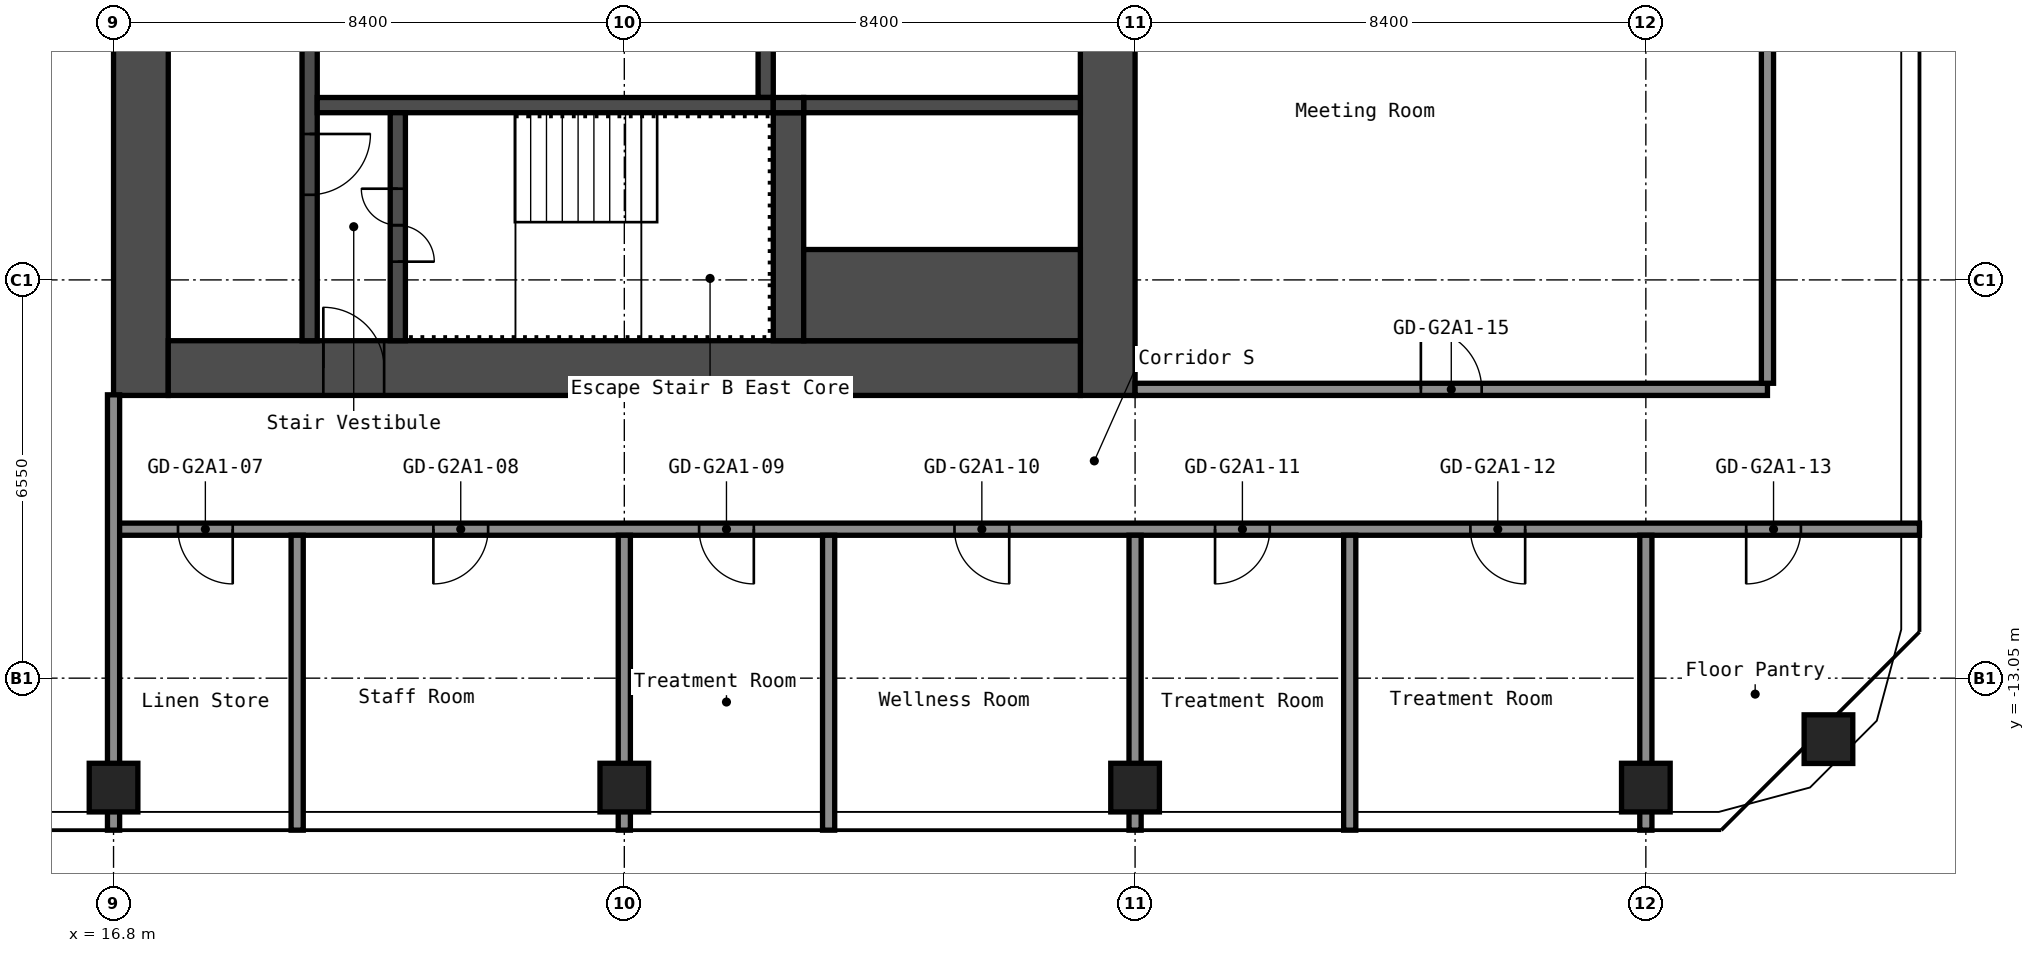
"""IFC4 building model, lengths in metres.
Left out: names, types, materials, properties, quantities, classifications, styles, units other than length and angle.
Written with IfcOpenShell. Run it as: python <this file> out.ifc"""

import sys

from ifc_helpers import new_model, si_unit, direction, frame, frame_2d, origin, origin_2d, place, context, subcontext, project, spatial, rectangle, hollow_rectangle, extrude, element, fill, save


model = new_model("IFC4")
c1 = context("Model", 3, precision=1e-05, world=origin(), true_north=direction((0.0, 1.0)))
c2 = subcontext(c1, "Body", "Model", "MODEL_VIEW")
j1 = project(units=[si_unit("LENGTHUNIT", "METRE"), si_unit("PLANEANGLEUNIT", "RADIAN")], contexts=[c1])
p1 = place(None, origin())
s1 = spatial("IfcSite", under=j1, at=p1, CompositionType="ELEMENT")
p2 = place(p1, origin())
s2 = spatial("IfcBuilding", under=s1, at=p2, CompositionType="ELEMENT")
p3 = place(p2, frame((0.0, 0.0, 91.4)))
s3 = spatial("IfcBuildingStorey", under=s2, at=p3, CompositionType="ELEMENT", Elevation=91.4)
for number, where, z_axis, x_axis in (
    (1, (16.8, -14.85, 0.0), (0.0, 0.0, 1.0), (1.0, 0.0, 0.0)),
    (2, (25.2, -14.85, 0.0), (0.0, 0.0, 1.0), (1.0, 0.0, 0.0)),
    (3, (33.6, -14.85, 0.0), (0.0, 0.0, 1.0), (1.0, 0.0, 0.0)),
    (4, (42.0, -14.85, 0.0), (0.0, 0.0, 1.0), (1.0, 0.0, 0.0)),
    (5, (45.003, -14.053, 0.0), (0.0, 0.0, 1.0), (1.0, 0.0, 0.0)),
):
    element("IfcColumn", number, at=place(p3, frame(where, z_axis=z_axis, x_axis=x_axis)), inside=s3, PredefinedType="COLUMN", context=c2, shape_type="SweptSolid", body=[
        extrude(hollow_rectangle(XDim=0.8, YDim=0.8, WallThickness=0.032, at=origin_2d()), origin(), (0.0, 0.0, 1.0), 2.8),
    ])
p4 = place(p3, frame((17.25, -8.4, 0.0), z_axis=(0.0, 0.0, 1.0), x_axis=(0.0, 1.0, 0.0)))
e6 = element("IfcWall", 6, at=p4, inside=s3, PredefinedType="SHEAR", context=c2, shape_type="SweptSolid", body=[
    extrude(rectangle(XDim=16.8, YDim=0.9, at=frame_2d((8.4, 0.0))), origin(), (0.0, 0.0, 1.0), 2.8),
])
p5 = place(p4, frame((7.6, 0.0, 0.0)))
e7 = element("IfcOpeningElement", 7, at=p5, cuts=e6, PredefinedType="OPENING", context=c2, shape_type="SweptSolid", body=[
    extrude(rectangle(XDim=1.2, YDim=2.1, at=frame_2d((0.6, 1.05))), frame((0.0, 0.46, 0.0), z_axis=(0.0, -1.0, 0.0), x_axis=(1.0, 0.0, 0.0)), (0.0, 0.0, 1.0), 0.92),
])
p6 = place(p3, frame((33.15, -8.4, 0.0), z_axis=(0.0, 0.0, 1.0), x_axis=(0.0, 1.0, 0.0)))
e8 = element("IfcWall", 8, at=p6, inside=s3, PredefinedType="SHEAR", context=c2, shape_type="SweptSolid", body=[
    extrude(rectangle(XDim=16.8, YDim=0.9, at=frame_2d((8.4, 0.0))), origin(), (0.0, 0.0, 1.0), 2.8),
])
p7 = place(p3, frame((17.7, -7.95, 0.0), z_axis=(0.0, 0.0, 1.0), x_axis=(1.0, 0.0, 0.0)))
e9 = element("IfcWall", 9, at=p7, inside=s3, PredefinedType="SHEAR", context=c2, shape_type="SweptSolid", body=[
    extrude(rectangle(XDim=15.0, YDim=0.9, at=frame_2d((7.5, 0.0))), origin(), (0.0, 0.0, 1.0), 2.8),
])
p8 = place(p7, frame((2.55, 0.0, 0.0)))
e10 = element("IfcOpeningElement", 10, at=p8, cuts=e9, PredefinedType="OPENING", context=c2, shape_type="SweptSolid", body=[
    extrude(rectangle(XDim=1.0, YDim=2.1, at=frame_2d((0.5, 1.05))), frame((0.0, 0.46, 0.0), z_axis=(0.0, -1.0, 0.0), x_axis=(1.0, 0.0, 0.0)), (0.0, 0.0, 1.0), 0.92),
])
p9 = place(p3, frame((20.025, -7.5, 0.0), z_axis=(0.0, 0.0, 1.0), x_axis=(0.0, 1.0, 0.0)))
e11 = element("IfcWall", 11, at=p9, inside=s3, PredefinedType="SHEAR", context=c2, shape_type="SweptSolid", body=[
    extrude(rectangle(XDim=6.3, YDim=0.25, at=frame_2d((3.15, 0.0))), origin(), (0.0, 0.0, 1.0), 2.8),
])
p10 = place(p9, frame((2.4, 0.0, 0.0)))
e12 = element("IfcOpeningElement", 12, at=p10, cuts=e11, PredefinedType="OPENING", context=c2, shape_type="SweptSolid", body=[
    extrude(rectangle(XDim=1.0, YDim=2.1, at=frame_2d((0.5, 1.05))), frame((0.0, 0.135, 0.0), z_axis=(0.0, -1.0, 0.0), x_axis=(1.0, 0.0, 0.0)), (0.0, 0.0, 1.0), 0.27),
])
p11 = place(p3, frame((27.525, -3.5, 0.0), z_axis=(0.0, 0.0, 1.0), x_axis=(0.0, 1.0, 0.0)))
e13 = element("IfcWall", 13, at=p11, inside=s3, PredefinedType="SHEAR", context=c2, shape_type="SweptSolid", body=[
    extrude(rectangle(XDim=2.05, YDim=0.25, at=frame_2d((1.025, 0.0))), origin(), (0.0, 0.0, 1.0), 2.8),
])
p12 = place(p3, frame((20.15, -3.625, 0.0), z_axis=(0.0, 0.0, 1.0), x_axis=(1.0, 0.0, 0.0)))
e14 = element("IfcWall", 14, at=p12, inside=s3, PredefinedType="SHEAR", context=c2, shape_type="SweptSolid", body=[
    extrude(rectangle(XDim=7.5, YDim=0.25, at=frame_2d((3.75, 0.0))), origin(), (0.0, 0.0, 1.0), 2.8),
])
p13 = place(p3, frame((21.475, -7.5, 0.0), z_axis=(0.0, 0.0, 1.0), x_axis=(0.0, 1.0, 0.0)))
e15 = element("IfcWall", 15, at=p13, inside=s3, PredefinedType="SHEAR", context=c2, shape_type="SweptSolid", body=[
    extrude(rectangle(XDim=3.75, YDim=0.25, at=frame_2d((1.875, 0.0))), origin(), (0.0, 0.0, 1.0), 2.8),
])
p14 = place(p13, frame((1.3, 0.0, 0.0)))
e16 = element("IfcOpeningElement", 16, at=p14, cuts=e15, PredefinedType="OPENING", context=c2, shape_type="SweptSolid", body=[
    extrude(rectangle(XDim=1.2, YDim=2.1, at=frame_2d((0.6, 1.05))), frame((0.0, 0.135, 0.0), z_axis=(0.0, -1.0, 0.0), x_axis=(1.0, 0.0, 0.0)), (0.0, 0.0, 1.0), 0.27),
])
p15 = place(p3, frame((27.9, -7.5, 0.0), z_axis=(0.0, 0.0, 1.0), x_axis=(0.0, 1.0, 0.0)))
e17 = element("IfcWall", 17, at=p15, inside=s3, PredefinedType="SHEAR", context=c2, shape_type="SweptSolid", body=[
    extrude(rectangle(XDim=3.75, YDim=0.5, at=frame_2d((1.875, 0.0))), origin(), (0.0, 0.0, 1.0), 2.8),
])
p16 = place(p3, frame((28.15, -3.625, 0.0), z_axis=(0.0, 0.0, 1.0), x_axis=(1.0, 0.0, 0.0)))
e18 = element("IfcWall", 18, at=p16, inside=s3, PredefinedType="SHEAR", context=c2, shape_type="SweptSolid", body=[
    extrude(rectangle(XDim=4.55, YDim=0.25, at=frame_2d((2.275, 0.0))), origin(), (0.0, 0.0, 1.0), 2.8),
])
p17 = place(p3, frame((28.15, -6.75, 0.0), z_axis=(0.0, 0.0, 1.0), x_axis=(1.0, 0.0, 0.0)))
e19 = element("IfcWall", 19, at=p17, inside=s3, PredefinedType="SHEAR", context=c2, shape_type="SweptSolid", body=[
    extrude(rectangle(XDim=4.55, YDim=1.5, at=frame_2d((2.275, 0.0))), origin(), (0.0, 0.0, 1.0), 2.8),
])
p18 = place(p3, frame((27.65, -3.625, 0.0), z_axis=(0.0, 0.0, 1.0), x_axis=(1.0, 0.0, 0.0)))
e20 = element("IfcWall", 20, at=p18, inside=s3, PredefinedType="SHEAR", context=c2, shape_type="SweptSolid", body=[
    extrude(rectangle(XDim=0.5, YDim=0.25, at=frame_2d((0.25, 0.0))), origin(), (0.0, 0.0, 1.0), 2.8),
])
p19 = place(p3, frame((16.8, -10.6, 0.0), z_axis=(0.0, 0.0, 1.0), x_axis=(1.0, 0.0, 0.0)))
e21 = element("IfcWall", 21, at=p19, inside=s3, PredefinedType="PARTITIONING", context=c2, shape_type="SweptSolid", body=[
    extrude(rectangle(XDim=29.7, YDim=0.2, at=frame_2d((14.85, 0.0))), origin(), (0.0, 0.0, 1.0), 2.8),
])
p20 = place(p19, frame((1.06, 0.0, 0.0)))
e22 = element("IfcOpeningElement", 22, at=p20, cuts=e21, PredefinedType="OPENING", context=c2, shape_type="SweptSolid", body=[
    extrude(rectangle(XDim=0.9, YDim=2.1, at=frame_2d((0.45, 1.05))), frame((0.0, 0.11, 0.0), z_axis=(0.0, -1.0, 0.0), x_axis=(1.0, 0.0, 0.0)), (0.0, 0.0, 1.0), 0.22),
])
p21 = place(p19, frame((5.26, 0.0, 0.0)))
e23 = element("IfcOpeningElement", 23, at=p21, cuts=e21, PredefinedType="OPENING", context=c2, shape_type="SweptSolid", body=[
    extrude(rectangle(XDim=0.9, YDim=2.1, at=frame_2d((0.45, 1.05))), frame((0.0, 0.11, 0.0), z_axis=(0.0, -1.0, 0.0), x_axis=(1.0, 0.0, 0.0)), (0.0, 0.0, 1.0), 0.22),
])
p22 = place(p19, frame((9.63, 0.0, 0.0)))
e24 = element("IfcOpeningElement", 24, at=p22, cuts=e21, PredefinedType="OPENING", context=c2, shape_type="SweptSolid", body=[
    extrude(rectangle(XDim=0.9, YDim=2.1, at=frame_2d((0.45, 1.05))), frame((0.0, 0.11, 0.0), z_axis=(0.0, -1.0, 0.0), x_axis=(1.0, 0.0, 0.0)), (0.0, 0.0, 1.0), 0.22),
])
p23 = place(p19, frame((13.83, 0.0, 0.0)))
e25 = element("IfcOpeningElement", 25, at=p23, cuts=e21, PredefinedType="OPENING", context=c2, shape_type="SweptSolid", body=[
    extrude(rectangle(XDim=0.9, YDim=2.1, at=frame_2d((0.45, 1.05))), frame((0.0, 0.11, 0.0), z_axis=(0.0, -1.0, 0.0), x_axis=(1.0, 0.0, 0.0)), (0.0, 0.0, 1.0), 0.22),
])
p24 = place(p19, frame((18.115, 0.0, 0.0)))
e26 = element("IfcOpeningElement", 26, at=p24, cuts=e21, PredefinedType="OPENING", context=c2, shape_type="SweptSolid", body=[
    extrude(rectangle(XDim=0.9, YDim=2.1, at=frame_2d((0.45, 1.05))), frame((0.0, 0.11, 0.0), z_axis=(0.0, -1.0, 0.0), x_axis=(1.0, 0.0, 0.0)), (0.0, 0.0, 1.0), 0.22),
])
p25 = place(p19, frame((22.315, 0.0, 0.0)))
e27 = element("IfcOpeningElement", 27, at=p25, cuts=e21, PredefinedType="OPENING", context=c2, shape_type="SweptSolid", body=[
    extrude(rectangle(XDim=0.9, YDim=2.1, at=frame_2d((0.45, 1.05))), frame((0.0, 0.11, 0.0), z_axis=(0.0, -1.0, 0.0), x_axis=(1.0, 0.0, 0.0)), (0.0, 0.0, 1.0), 0.22),
])
p26 = place(p19, frame((26.85, 0.0, 0.0)))
e28 = element("IfcOpeningElement", 28, at=p26, cuts=e21, PredefinedType="OPENING", context=c2, shape_type="SweptSolid", body=[
    extrude(rectangle(XDim=0.9, YDim=2.1, at=frame_2d((0.45, 1.05))), frame((0.0, 0.11, 0.0), z_axis=(0.0, -1.0, 0.0), x_axis=(1.0, 0.0, 0.0)), (0.0, 0.0, 1.0), 0.22),
])
p27 = place(p3, frame((33.6, -8.3, 0.0), z_axis=(0.0, 0.0, 1.0), x_axis=(1.0, 0.0, 0.0)))
e29 = element("IfcWall", 29, at=p27, inside=s3, PredefinedType="PARTITIONING", context=c2, shape_type="SweptSolid", body=[
    extrude(rectangle(XDim=10.4, YDim=0.2, at=frame_2d((5.2, 0.0))), origin(), (0.0, 0.0, 1.0), 2.8),
])
p28 = place(p27, frame((4.7, 0.0, 0.0)))
e30 = element("IfcOpeningElement", 30, at=p28, cuts=e29, PredefinedType="OPENING", context=c2, shape_type="SweptSolid", body=[
    extrude(rectangle(XDim=1.0, YDim=2.1, at=frame_2d((0.5, 1.05))), frame((0.0, 0.11, 0.0), z_axis=(0.0, -1.0, 0.0), x_axis=(1.0, 0.0, 0.0)), (0.0, 0.0, 1.0), 0.22),
])
p29 = place(p3, frame((16.8, -15.55, 0.0), z_axis=(0.0, 0.0, 1.0), x_axis=(0.0, 1.0, 0.0)))
e31 = element("IfcWall", 31, at=p29, inside=s3, PredefinedType="PARTITIONING", context=c2, shape_type="SweptSolid", body=[
    extrude(rectangle(XDim=7.16, YDim=0.2, at=frame_2d((3.58, 0.0))), origin(), (0.0, 0.0, 1.0), 2.8),
])
for number, where, z_axis, x_axis in (
    (32, (19.82, -15.55, 0.0), (0.0, 0.0, 1.0), (0.0, 1.0, 0.0)),
    (33, (25.2, -15.55, 0.0), (0.0, 0.0, 1.0), (0.0, 1.0, 0.0)),
    (34, (28.56, -15.55, 0.0), (0.0, 0.0, 1.0), (0.0, 1.0, 0.0)),
    (35, (33.6, -15.55, 0.0), (0.0, 0.0, 1.0), (0.0, 1.0, 0.0)),
    (36, (37.13, -15.55, 0.0), (0.0, 0.0, 1.0), (0.0, 1.0, 0.0)),
    (37, (42.0, -15.55, 0.0), (0.0, 0.0, 1.0), (0.0, 1.0, 0.0)),
):
    element("IfcWall", number, at=place(p3, frame(where, z_axis=z_axis, x_axis=x_axis)), inside=s3, PredefinedType="PARTITIONING", context=c2, shape_type="SweptSolid", body=[
        extrude(rectangle(XDim=4.85, YDim=0.2, at=frame_2d((2.425, 0.0))), origin(), (0.0, 0.0, 1.0), 2.8),
    ])
p30 = place(p3, frame((44.0, -8.2, 0.0), z_axis=(0.0, 0.0, 1.0), x_axis=(0.0, 1.0, 0.0)))
e38 = element("IfcWall", 38, at=p30, inside=s3, PredefinedType="PARTITIONING", context=c2, shape_type="SweptSolid", body=[
    extrude(rectangle(XDim=16.4, YDim=0.2, at=frame_2d((8.2, 0.0))), origin(), (0.0, 0.0, 1.0), 2.8),
])
p31 = place(p8, origin())
e39 = element("IfcDoor", 39, at=p31, inside=s3, OperationType="SINGLE_SWING_RIGHT", PredefinedType="DOOR", context=c2, shape_type="SweptSolid", body=[
    extrude(rectangle(XDim=1.0, YDim=2.1, at=frame_2d((0.5, 1.05))), frame((0.0, 0.025, 0.0), z_axis=(0.0, -1.0, 0.0), x_axis=(1.0, 0.0, 0.0)), (0.0, 0.0, 1.0), 0.05),
])
fill(e10, e39)
p32 = place(p14, origin())
e40 = element("IfcDoor", 40, at=p32, inside=s3, OperationType="DOUBLE_DOOR_SINGLE_SWING", PredefinedType="DOOR", context=c2, shape_type="SweptSolid", body=[
    extrude(rectangle(XDim=1.2, YDim=2.1, at=frame_2d((0.6, 1.05))), frame((0.0, 0.025, 0.0), z_axis=(0.0, -1.0, 0.0), x_axis=(1.0, 0.0, 0.0)), (0.0, 0.0, 1.0), 0.05),
])
fill(e16, e40)
p33 = place(p10, origin())
e41 = element("IfcDoor", 41, at=p33, inside=s3, OperationType="SINGLE_SWING_RIGHT", PredefinedType="DOOR", context=c2, shape_type="SweptSolid", body=[
    extrude(rectangle(XDim=1.0, YDim=2.1, at=frame_2d((0.5, 1.05))), frame((0.0, 0.025, 0.0), z_axis=(0.0, -1.0, 0.0), x_axis=(1.0, 0.0, 0.0)), (0.0, 0.0, 1.0), 0.05),
])
fill(e12, e41)
p34 = place(p20, origin())
e42 = element("IfcDoor", 42, at=p34, inside=s3, OperationType="SINGLE_SWING_RIGHT", PredefinedType="DOOR", context=c2, shape_type="SweptSolid", body=[
    extrude(rectangle(XDim=0.9, YDim=2.1, at=frame_2d((0.45, 1.05))), frame((0.0, 0.025, 0.0), z_axis=(0.0, -1.0, 0.0), x_axis=(1.0, 0.0, 0.0)), (0.0, 0.0, 1.0), 0.05),
])
fill(e22, e42)
p35 = place(p21, origin())
e43 = element("IfcDoor", 43, at=p35, inside=s3, OperationType="SINGLE_SWING_LEFT", PredefinedType="DOOR", context=c2, shape_type="SweptSolid", body=[
    extrude(rectangle(XDim=0.9, YDim=2.1, at=frame_2d((0.45, 1.05))), frame((0.0, 0.025, 0.0), z_axis=(0.0, -1.0, 0.0), x_axis=(1.0, 0.0, 0.0)), (0.0, 0.0, 1.0), 0.05),
])
fill(e23, e43)
p36 = place(p22, origin())
e44 = element("IfcDoor", 44, at=p36, inside=s3, OperationType="SINGLE_SWING_RIGHT", PredefinedType="DOOR", context=c2, shape_type="SweptSolid", body=[
    extrude(rectangle(XDim=0.9, YDim=2.1, at=frame_2d((0.45, 1.05))), frame((0.0, 0.025, 0.0), z_axis=(0.0, -1.0, 0.0), x_axis=(1.0, 0.0, 0.0)), (0.0, 0.0, 1.0), 0.05),
])
fill(e24, e44)
p37 = place(p23, origin())
e45 = element("IfcDoor", 45, at=p37, inside=s3, OperationType="SINGLE_SWING_RIGHT", PredefinedType="DOOR", context=c2, shape_type="SweptSolid", body=[
    extrude(rectangle(XDim=0.9, YDim=2.1, at=frame_2d((0.45, 1.05))), frame((0.0, 0.025, 0.0), z_axis=(0.0, -1.0, 0.0), x_axis=(1.0, 0.0, 0.0)), (0.0, 0.0, 1.0), 0.05),
])
fill(e25, e45)
p38 = place(p24, origin())
e46 = element("IfcDoor", 46, at=p38, inside=s3, OperationType="SINGLE_SWING_LEFT", PredefinedType="DOOR", context=c2, shape_type="SweptSolid", body=[
    extrude(rectangle(XDim=0.9, YDim=2.1, at=frame_2d((0.45, 1.05))), frame((0.0, 0.025, 0.0), z_axis=(0.0, -1.0, 0.0), x_axis=(1.0, 0.0, 0.0)), (0.0, 0.0, 1.0), 0.05),
])
fill(e26, e46)
p39 = place(p25, origin())
e47 = element("IfcDoor", 47, at=p39, inside=s3, OperationType="SINGLE_SWING_RIGHT", PredefinedType="DOOR", context=c2, shape_type="SweptSolid", body=[
    extrude(rectangle(XDim=0.9, YDim=2.1, at=frame_2d((0.45, 1.05))), frame((0.0, 0.025, 0.0), z_axis=(0.0, -1.0, 0.0), x_axis=(1.0, 0.0, 0.0)), (0.0, 0.0, 1.0), 0.05),
])
fill(e27, e47)
p40 = place(p26, origin())
e48 = element("IfcDoor", 48, at=p40, inside=s3, OperationType="SINGLE_SWING_LEFT", PredefinedType="DOOR", context=c2, shape_type="SweptSolid", body=[
    extrude(rectangle(XDim=0.9, YDim=2.1, at=frame_2d((0.45, 1.05))), frame((0.0, 0.025, 0.0), z_axis=(0.0, -1.0, 0.0), x_axis=(1.0, 0.0, 0.0)), (0.0, 0.0, 1.0), 0.05),
])
fill(e28, e48)
p41 = place(p28, origin())
e49 = element("IfcDoor", 49, at=p41, inside=s3, OperationType="SINGLE_SWING_RIGHT", PredefinedType="DOOR", context=c2, shape_type="SweptSolid", body=[
    extrude(rectangle(XDim=1.0, YDim=2.1, at=frame_2d((0.5, 1.05))), frame((0.0, 0.025, 0.0), z_axis=(0.0, -1.0, 0.0), x_axis=(1.0, 0.0, 0.0)), (0.0, 0.0, 1.0), 0.05),
])
fill(e30, e49)
save(model, sys.argv[1])
